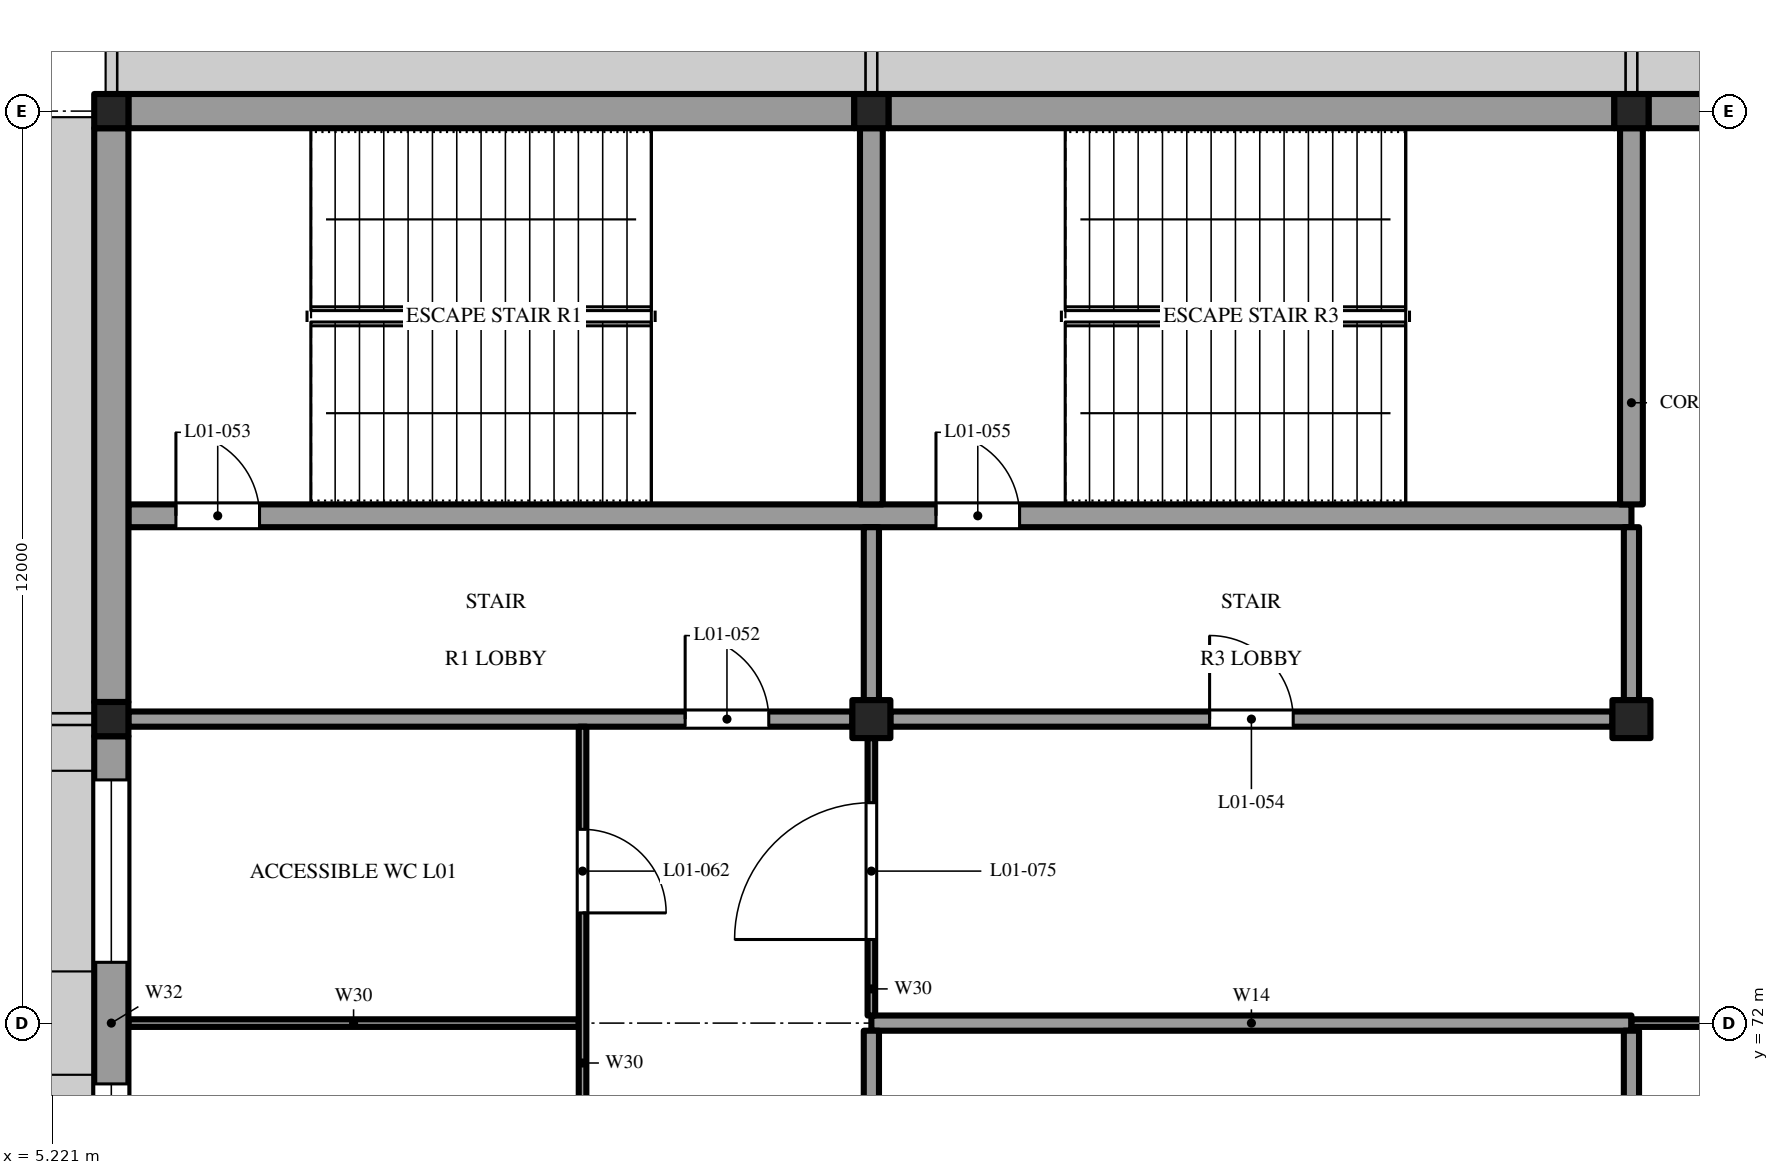
"""IFC4 building model, lengths in metres.
Left out: names, types, materials, properties, quantities, classifications, styles, units other than length and angle.
Written with IfcOpenShell. Run it as: python <this file> out.ifc"""

import sys

from ifc_helpers import new_model, si_unit, direction, frame, frame_2d, origin, origin_2d, place, context, subcontext, project, spatial, rectangle, extrude, element, fill, save


model = new_model("IFC4")
c1 = context("Model", 3, precision=1e-05, world=origin(), true_north=direction((0.0, 1.0)))
c2 = subcontext(c1, "Body", "Model", "MODEL_VIEW")
j1 = project(units=[si_unit("LENGTHUNIT", "METRE"), si_unit("PLANEANGLEUNIT", "RADIAN")], contexts=[c1])
p1 = place(None, origin())
s1 = spatial("IfcSite", under=j1, at=p1, CompositionType="ELEMENT")
p2 = place(p1, origin())
s2 = spatial("IfcBuilding", under=s1, at=p2, CompositionType="ELEMENT")
p3 = place(p2, frame((0.0, 0.0, 7.2)))
s3 = spatial("IfcBuildingStorey", under=s2, at=p3, CompositionType="ELEMENT", Elevation=7.2)
for number, where, z_axis, x_axis in (
    (1, (6.0, 76.0, 0.0), (0.0, 0.0, 1.0), (1.0, 0.0, 0.0)),
    (2, (6.0, 84.0, 0.0), (0.0, 0.0, 1.0), (1.0, 0.0, 0.0)),
):
    element("IfcColumn", number, at=place(p3, frame(where, z_axis=z_axis, x_axis=x_axis)), inside=s3, PredefinedType="COLUMN", context=c2, shape_type="SweptSolid", body=[
        extrude(rectangle(XDim=0.45, YDim=0.45, at=origin_2d()), origin(), (0.0, 0.0, 1.0), 4.8),
    ])
p4 = place(p3, frame((16.0, 76.0, 0.0), z_axis=(0.0, 0.0, 1.0), x_axis=(1.0, 0.0, 0.0)))
e3 = element("IfcColumn", 3, at=p4, inside=s3, PredefinedType="COLUMN", context=c2, shape_type="SweptSolid", body=[
    extrude(rectangle(XDim=0.5, YDim=0.5, at=origin_2d()), origin(), (0.0, 0.0, 1.0), 4.8),
])
p5 = place(p3, frame((16.0, 84.0, 0.0), z_axis=(0.0, 0.0, 1.0), x_axis=(1.0, 0.0, 0.0)))
e4 = element("IfcColumn", 4, at=p5, inside=s3, PredefinedType="COLUMN", context=c2, shape_type="SweptSolid", body=[
    extrude(rectangle(XDim=0.45, YDim=0.45, at=origin_2d()), origin(), (0.0, 0.0, 1.0), 4.8),
])
p6 = place(p3, frame((26.0, 76.0, 0.0), z_axis=(0.0, 0.0, 1.0), x_axis=(1.0, 0.0, 0.0)))
e5 = element("IfcColumn", 5, at=p6, inside=s3, PredefinedType="COLUMN", context=c2, shape_type="SweptSolid", body=[
    extrude(rectangle(XDim=0.5, YDim=0.5, at=origin_2d()), origin(), (0.0, 0.0, 1.0), 4.8),
])
p7 = place(p3, frame((26.0, 84.0, 0.0), z_axis=(0.0, 0.0, 1.0), x_axis=(1.0, 0.0, 0.0)))
e6 = element("IfcColumn", 6, at=p7, inside=s3, PredefinedType="COLUMN", context=c2, shape_type="SweptSolid", body=[
    extrude(rectangle(XDim=0.45, YDim=0.45, at=origin_2d()), origin(), (0.0, 0.0, 1.0), 4.8),
])
p8 = place(p3, frame((6.225, 72.0, 0.0), z_axis=(0.0, 0.0, 1.0), x_axis=(1.0, 0.0, 0.0)))
e7 = element("IfcWall", 7, at=p8, inside=s3, PredefinedType="PARTITIONING", context=c2, shape_type="SweptSolid", body=[
    extrude(rectangle(XDim=5.925, YDim=0.1, at=frame_2d((2.962, 0.0))), origin(), (0.0, 0.0, 1.0), 4.45),
])
p9 = place(p3, frame((16.0, 72.0, 0.0), z_axis=(0.0, 0.0, 1.0), x_axis=(1.0, 0.0, 0.0)))
e8 = element("IfcWall", 8, at=p9, inside=s3, PredefinedType="SOLIDWALL", context=c2, shape_type="SweptSolid", body=[
    extrude(rectangle(XDim=10.0, YDim=0.2, at=frame_2d((5.0, 0.0))), origin(), (0.0, 0.0, 1.0), 4.45),
])
p10 = place(p3, frame((26.0, 72.0, 0.0), z_axis=(0.0, 0.0, 1.0), x_axis=(1.0, 0.0, 0.0)))
e9 = element("IfcWall", 9, at=p10, inside=s3, PredefinedType="PARTITIONING", context=c2, shape_type="SweptSolid", body=[
    extrude(rectangle(XDim=19.775, YDim=0.1, at=frame_2d((9.887, 0.0))), origin(), (0.0, 0.0, 1.0), 4.45),
])
p11 = place(p10, frame((9.4, 0.0, 0.0)))
e10 = element("IfcOpeningElement", 10, at=p11, cuts=e9, PredefinedType="OPENING", context=c2, shape_type="SweptSolid", body=[
    extrude(rectangle(XDim=1.2, YDim=2.1, at=frame_2d((0.6, 1.05))), frame((0.0, 0.06, 0.0), z_axis=(0.0, -1.0, 0.0), x_axis=(1.0, 0.0, 0.0)), (0.0, 0.0, 1.0), 0.12),
])
p12 = place(p3, frame((6.225, 76.0, 0.0), z_axis=(0.0, 0.0, 1.0), x_axis=(1.0, 0.0, 0.0)))
e11 = element("IfcWall", 11, at=p12, inside=s3, PredefinedType="SOLIDWALL", context=c2, shape_type="SweptSolid", body=[
    extrude(rectangle(XDim=9.525, YDim=0.2, at=frame_2d((4.762, 0.0))), origin(), (0.0, 0.0, 1.0), 4.45),
])
p13 = place(p12, frame((7.325, 0.0, 0.0)))
e12 = element("IfcOpeningElement", 12, at=p13, cuts=e11, PredefinedType="OPENING", context=c2, shape_type="SweptSolid", body=[
    extrude(rectangle(XDim=1.1, YDim=2.1, at=frame_2d((0.55, 1.05))), frame((0.0, 0.11, 0.0), z_axis=(0.0, -1.0, 0.0), x_axis=(1.0, 0.0, 0.0)), (0.0, 0.0, 1.0), 0.22),
])
p14 = place(p3, frame((16.25, 76.0, 0.0), z_axis=(0.0, 0.0, 1.0), x_axis=(1.0, 0.0, 0.0)))
e13 = element("IfcWall", 13, at=p14, inside=s3, PredefinedType="SOLIDWALL", context=c2, shape_type="SweptSolid", body=[
    extrude(rectangle(XDim=9.5, YDim=0.2, at=frame_2d((4.75, 0.0))), origin(), (0.0, 0.0, 1.0), 4.45),
])
p15 = place(p14, frame((4.2, 0.0, 0.0)))
e14 = element("IfcOpeningElement", 14, at=p15, cuts=e13, PredefinedType="OPENING", context=c2, shape_type="SweptSolid", body=[
    extrude(rectangle(XDim=1.1, YDim=2.1, at=frame_2d((0.55, 1.05))), frame((0.0, 0.11, 0.0), z_axis=(0.0, -1.0, 0.0), x_axis=(1.0, 0.0, 0.0)), (0.0, 0.0, 1.0), 0.22),
])
p16 = place(p3, frame((6.225, 78.675, 0.0), z_axis=(0.0, 0.0, 1.0), x_axis=(1.0, 0.0, 0.0)))
e15 = element("IfcWall", 15, at=p16, inside=s3, PredefinedType="SHEAR", context=c2, shape_type="SweptSolid", body=[
    extrude(rectangle(XDim=19.775, YDim=0.3, at=frame_2d((9.887, 0.0))), origin(), (0.0, 0.0, 1.0), 4.45),
])
p17 = place(p16, frame((0.625, 0.0, 0.0)))
e16 = element("IfcOpeningElement", 16, at=p17, cuts=e15, PredefinedType="OPENING", context=c2, shape_type="SweptSolid", body=[
    extrude(rectangle(XDim=1.1, YDim=2.1, at=frame_2d((0.55, 1.05))), frame((0.0, 0.16, 0.0), z_axis=(0.0, -1.0, 0.0), x_axis=(1.0, 0.0, 0.0)), (0.0, 0.0, 1.0), 0.32),
])
p18 = place(p16, frame((10.625, 0.0, 0.0)))
e17 = element("IfcOpeningElement", 17, at=p18, cuts=e15, PredefinedType="OPENING", context=c2, shape_type="SweptSolid", body=[
    extrude(rectangle(XDim=1.1, YDim=2.1, at=frame_2d((0.55, 1.05))), frame((0.0, 0.16, 0.0), z_axis=(0.0, -1.0, 0.0), x_axis=(1.0, 0.0, 0.0)), (0.0, 0.0, 1.0), 0.32),
])
for number, where, z_axis, x_axis in (
    (18, (15.775, 84.0, 0.0), (0.0, 0.0, 1.0), (-1.0, 0.0, 0.0)),
    (19, (25.775, 84.0, 0.0), (0.0, 0.0, 1.0), (-1.0, 0.0, 0.0)),
):
    element("IfcWall", number, at=place(p3, frame(where, z_axis=z_axis, x_axis=x_axis)), inside=s3, PredefinedType="SOLIDWALL", context=c2, shape_type="SweptSolid", body=[
        extrude(rectangle(XDim=9.55, YDim=0.45, at=frame_2d((4.775, 0.0))), origin(), (0.0, 0.0, 1.0), 4.45),
    ])
p19 = place(p3, frame((35.775, 84.0, 0.0), z_axis=(0.0, 0.0, 1.0), x_axis=(-1.0, 0.0, 0.0)))
e20 = element("IfcWall", 20, at=p19, inside=s3, PredefinedType="SOLIDWALL", context=c2, shape_type="SweptSolid", body=[
    extrude(rectangle(XDim=9.55, YDim=0.45, at=frame_2d((4.775, 0.0))), origin(), (0.0, 0.0, 1.0), 4.45),
])
p20 = place(p19, frame((6.075, 0.0, 0.9)))
e21 = element("IfcOpeningElement", 21, at=p20, cuts=e20, PredefinedType="OPENING", context=c2, shape_type="SweptSolid", body=[
    extrude(rectangle(XDim=2.4, YDim=2.2, at=frame_2d((1.2, 1.1))), frame((0.0, 0.235, 0.0), z_axis=(0.0, -1.0, 0.0), x_axis=(1.0, 0.0, 0.0)), (0.0, 0.0, 1.0), 0.47),
])
p21 = place(p19, frame((1.075, 0.0, 0.9)))
e22 = element("IfcOpeningElement", 22, at=p21, cuts=e20, PredefinedType="OPENING", context=c2, shape_type="SweptSolid", body=[
    extrude(rectangle(XDim=2.4, YDim=2.2, at=frame_2d((1.2, 1.1))), frame((0.0, 0.235, 0.0), z_axis=(0.0, -1.0, 0.0), x_axis=(1.0, 0.0, 0.0)), (0.0, 0.0, 1.0), 0.47),
])
p22 = place(p3, frame((6.0, 75.775, 0.0), z_axis=(0.0, 0.0, 1.0), x_axis=(0.0, -1.0, 0.0)))
e23 = element("IfcWall", 23, at=p22, inside=s3, PredefinedType="SOLIDWALL", context=c2, shape_type="SweptSolid", body=[
    extrude(rectangle(XDim=7.55, YDim=0.45, at=frame_2d((3.775, 0.0))), origin(), (0.0, 0.0, 1.0), 4.45),
])
p23 = place(p22, frame((4.575, 0.0, 0.9)))
e24 = element("IfcOpeningElement", 24, at=p23, cuts=e23, PredefinedType="OPENING", context=c2, shape_type="SweptSolid", body=[
    extrude(rectangle(XDim=2.4, YDim=2.2, at=frame_2d((1.2, 1.1))), frame((0.0, 0.235, 0.0), z_axis=(0.0, -1.0, 0.0), x_axis=(1.0, 0.0, 0.0)), (0.0, 0.0, 1.0), 0.47),
])
p24 = place(p22, frame((0.575, 0.0, 0.9)))
e25 = element("IfcOpeningElement", 25, at=p24, cuts=e23, PredefinedType="OPENING", context=c2, shape_type="SweptSolid", body=[
    extrude(rectangle(XDim=2.4, YDim=2.2, at=frame_2d((1.2, 1.1))), frame((0.0, 0.235, 0.0), z_axis=(0.0, -1.0, 0.0), x_axis=(1.0, 0.0, 0.0)), (0.0, 0.0, 1.0), 0.47),
])
p25 = place(p3, frame((6.0, 83.775, 0.0), z_axis=(0.0, 0.0, 1.0), x_axis=(0.0, -1.0, 0.0)))
e26 = element("IfcWall", 26, at=p25, inside=s3, PredefinedType="SOLIDWALL", context=c2, shape_type="SweptSolid", body=[
    extrude(rectangle(XDim=7.55, YDim=0.45, at=frame_2d((3.775, 0.0))), origin(), (0.0, 0.0, 1.0), 4.45),
])
p26 = place(p3, frame((12.2, 60.05, 0.0), z_axis=(0.0, 0.0, 1.0), x_axis=(0.0, 1.0, 0.0)))
e27 = element("IfcWall", 27, at=p26, inside=s3, PredefinedType="PARTITIONING", context=c2, shape_type="SweptSolid", body=[
    extrude(rectangle(XDim=15.85, YDim=0.1, at=frame_2d((7.925, 0.0))), origin(), (0.0, 0.0, 1.0), 4.45),
])
p27 = place(p26, frame((2.45, 0.0, 0.0)))
e28 = element("IfcOpeningElement", 28, at=p27, cuts=e27, PredefinedType="OPENING", context=c2, shape_type="SweptSolid", body=[
    extrude(rectangle(XDim=1.0, YDim=2.1, at=frame_2d((0.5, 1.05))), frame((0.0, 0.06, 0.0), z_axis=(0.0, -1.0, 0.0), x_axis=(1.0, 0.0, 0.0)), (0.0, 0.0, 1.0), 0.12),
])
p28 = place(p26, frame((8.45, 0.0, 0.0)))
e29 = element("IfcOpeningElement", 29, at=p28, cuts=e27, PredefinedType="OPENING", context=c2, shape_type="SweptSolid", body=[
    extrude(rectangle(XDim=1.0, YDim=2.1, at=frame_2d((0.5, 1.05))), frame((0.0, 0.06, 0.0), z_axis=(0.0, -1.0, 0.0), x_axis=(1.0, 0.0, 0.0)), (0.0, 0.0, 1.0), 0.12),
])
p29 = place(p26, frame((13.4, 0.0, 0.0)))
e30 = element("IfcOpeningElement", 30, at=p29, cuts=e27, PredefinedType="OPENING", context=c2, shape_type="SweptSolid", body=[
    extrude(rectangle(XDim=1.1, YDim=2.1, at=frame_2d((0.55, 1.05))), frame((0.0, 0.06, 0.0), z_axis=(0.0, -1.0, 0.0), x_axis=(1.0, 0.0, 0.0)), (0.0, 0.0, 1.0), 0.12),
])
p30 = place(p3, frame((16.0, 68.25, 0.0), z_axis=(0.0, 0.0, 1.0), x_axis=(0.0, 1.0, 0.0)))
e31 = element("IfcWall", 31, at=p30, inside=s3, PredefinedType="SOLIDWALL", context=c2, shape_type="SweptSolid", body=[
    extrude(rectangle(XDim=3.65, YDim=0.2, at=frame_2d((1.825, 0.0))), origin(), (0.0, 0.0, 1.0), 4.45),
])
p31 = place(p30, frame((0.25, 0.0, 0.0)))
e32 = element("IfcOpeningElement", 32, at=p31, cuts=e31, PredefinedType="OPENING", context=c2, shape_type="SweptSolid", body=[
    extrude(rectangle(XDim=1.0, YDim=2.1, at=frame_2d((0.5, 1.05))), frame((0.0, 0.11, 0.0), z_axis=(0.0, -1.0, 0.0), x_axis=(1.0, 0.0, 0.0)), (0.0, 0.0, 1.0), 0.22),
])
p32 = place(p3, frame((16.0, 72.1, 0.0), z_axis=(0.0, 0.0, 1.0), x_axis=(0.0, 1.0, 0.0)))
e33 = element("IfcWall", 33, at=p32, inside=s3, PredefinedType="PARTITIONING", context=c2, shape_type="SweptSolid", body=[
    extrude(rectangle(XDim=3.65, YDim=0.1, at=frame_2d((1.825, 0.0))), origin(), (0.0, 0.0, 1.0), 4.45),
])
p33 = place(p32, frame((1.0, 0.0, 0.0)))
e34 = element("IfcOpeningElement", 34, at=p33, cuts=e33, PredefinedType="OPENING", context=c2, shape_type="SweptSolid", body=[
    extrude(rectangle(XDim=1.8, YDim=2.1, at=frame_2d((0.9, 1.05))), frame((0.0, 0.06, 0.0), z_axis=(0.0, -1.0, 0.0), x_axis=(1.0, 0.0, 0.0)), (0.0, 0.0, 1.0), 0.12),
])
p34 = place(p3, frame((16.0, 76.25, 0.0), z_axis=(0.0, 0.0, 1.0), x_axis=(0.0, 1.0, 0.0)))
e35 = element("IfcWall", 35, at=p34, inside=s3, PredefinedType="SOLIDWALL", context=c2, shape_type="SweptSolid", body=[
    extrude(rectangle(XDim=2.275, YDim=0.2, at=frame_2d((1.137, 0.0))), origin(), (0.0, 0.0, 1.0), 4.45),
])
p35 = place(p3, frame((16.0, 78.825, 0.0), z_axis=(0.0, 0.0, 1.0), x_axis=(0.0, 1.0, 0.0)))
e36 = element("IfcWall", 36, at=p35, inside=s3, PredefinedType="SHEAR", context=c2, shape_type="SweptSolid", body=[
    extrude(rectangle(XDim=4.95, YDim=0.3, at=frame_2d((2.475, 0.0))), origin(), (0.0, 0.0, 1.0), 4.45),
])
p36 = place(p3, frame((26.0, 68.25, 0.0), z_axis=(0.0, 0.0, 1.0), x_axis=(0.0, 1.0, 0.0)))
e37 = element("IfcWall", 37, at=p36, inside=s3, PredefinedType="SOLIDWALL", context=c2, shape_type="SweptSolid", body=[
    extrude(rectangle(XDim=3.65, YDim=0.2, at=frame_2d((1.825, 0.0))), origin(), (0.0, 0.0, 1.0), 4.45),
])
p37 = place(p3, frame((26.0, 76.25, 0.0), z_axis=(0.0, 0.0, 1.0), x_axis=(0.0, 1.0, 0.0)))
e38 = element("IfcWall", 38, at=p37, inside=s3, PredefinedType="SOLIDWALL", context=c2, shape_type="SweptSolid", body=[
    extrude(rectangle(XDim=2.275, YDim=0.2, at=frame_2d((1.137, 0.0))), origin(), (0.0, 0.0, 1.0), 4.45),
])
p38 = place(p3, frame((26.0, 78.825, 0.0), z_axis=(0.0, 0.0, 1.0), x_axis=(0.0, 1.0, 0.0)))
e39 = element("IfcWall", 39, at=p38, inside=s3, PredefinedType="SHEAR", context=c2, shape_type="SweptSolid", body=[
    extrude(rectangle(XDim=4.95, YDim=0.3, at=frame_2d((2.475, 0.0))), origin(), (0.0, 0.0, 1.0), 4.45),
])
p39 = place(p13, origin())
e40 = element("IfcDoor", 40, at=p39, inside=s3, OperationType="SINGLE_SWING_LEFT", PredefinedType="DOOR", context=c2, shape_type="SweptSolid", body=[
    extrude(rectangle(XDim=1.1, YDim=2.1, at=frame_2d((0.55, 1.05))), frame((0.0, 0.025, 0.0), z_axis=(0.0, -1.0, 0.0), x_axis=(1.0, 0.0, 0.0)), (0.0, 0.0, 1.0), 0.05),
])
fill(e12, e40)
p40 = place(p17, origin())
e41 = element("IfcDoor", 41, at=p40, inside=s3, OperationType="SINGLE_SWING_RIGHT", PredefinedType="DOOR", context=c2, shape_type="SweptSolid", body=[
    extrude(rectangle(XDim=1.1, YDim=2.1, at=frame_2d((0.55, 1.05))), frame((0.0, 0.025, 0.0), z_axis=(0.0, -1.0, 0.0), x_axis=(1.0, 0.0, 0.0)), (0.0, 0.0, 1.0), 0.05),
])
fill(e16, e41)
p41 = place(p15, origin())
e42 = element("IfcDoor", 42, at=p41, inside=s3, OperationType="SINGLE_SWING_LEFT", PredefinedType="DOOR", context=c2, shape_type="SweptSolid", body=[
    extrude(rectangle(XDim=1.1, YDim=2.1, at=frame_2d((0.55, 1.05))), frame((0.0, 0.025, 0.0), z_axis=(0.0, -1.0, 0.0), x_axis=(1.0, 0.0, 0.0)), (0.0, 0.0, 1.0), 0.05),
])
fill(e14, e42)
p42 = place(p18, origin())
e43 = element("IfcDoor", 43, at=p42, inside=s3, OperationType="SINGLE_SWING_RIGHT", PredefinedType="DOOR", context=c2, shape_type="SweptSolid", body=[
    extrude(rectangle(XDim=1.1, YDim=2.1, at=frame_2d((0.55, 1.05))), frame((0.0, 0.025, 0.0), z_axis=(0.0, -1.0, 0.0), x_axis=(1.0, 0.0, 0.0)), (0.0, 0.0, 1.0), 0.05),
])
fill(e17, e43)
p43 = place(p29, frame((1.1, 0.0, 0.0), z_axis=(0.0, 0.0, 1.0), x_axis=(-1.0, 0.0, 0.0)))
e44 = element("IfcDoor", 44, at=p43, inside=s3, OperationType="SINGLE_SWING_RIGHT", PredefinedType="DOOR", context=c2, shape_type="SweptSolid", body=[
    extrude(rectangle(XDim=1.1, YDim=2.1, at=frame_2d((0.55, 1.05))), frame((0.0, 0.025, 0.0), z_axis=(0.0, -1.0, 0.0), x_axis=(1.0, 0.0, 0.0)), (0.0, 0.0, 1.0), 0.05),
])
fill(e30, e44)
p44 = place(p33, origin())
e45 = element("IfcDoor", 45, at=p44, inside=s3, OperationType="DOUBLE_DOOR_SINGLE_SWING", PredefinedType="DOOR", context=c2, shape_type="SweptSolid", body=[
    extrude(rectangle(XDim=1.8, YDim=2.1, at=frame_2d((0.9, 1.05))), frame((0.0, 0.025, 0.0), z_axis=(0.0, -1.0, 0.0), x_axis=(1.0, 0.0, 0.0)), (0.0, 0.0, 1.0), 0.05),
])
fill(e34, e45)
p45 = place(p23, origin())
e46 = element("IfcWindow", 46, at=p45, inside=s3, PartitioningType="SINGLE_PANEL", PredefinedType="WINDOW", context=c2, shape_type="SweptSolid", body=[
    extrude(rectangle(XDim=2.4, YDim=2.2, at=frame_2d((1.2, 1.1))), frame((0.0, 0.215, 0.0), z_axis=(0.0, -1.0, 0.0), x_axis=(1.0, 0.0, 0.0)), (0.0, 0.0, 1.0), 0.06),
])
fill(e24, e46)
p46 = place(p24, origin())
e47 = element("IfcWindow", 47, at=p46, inside=s3, PartitioningType="SINGLE_PANEL", PredefinedType="WINDOW", context=c2, shape_type="SweptSolid", body=[
    extrude(rectangle(XDim=2.4, YDim=2.2, at=frame_2d((1.2, 1.1))), frame((0.0, 0.215, 0.0), z_axis=(0.0, -1.0, 0.0), x_axis=(1.0, 0.0, 0.0)), (0.0, 0.0, 1.0), 0.06),
])
fill(e25, e47)
save(model, sys.argv[1])
